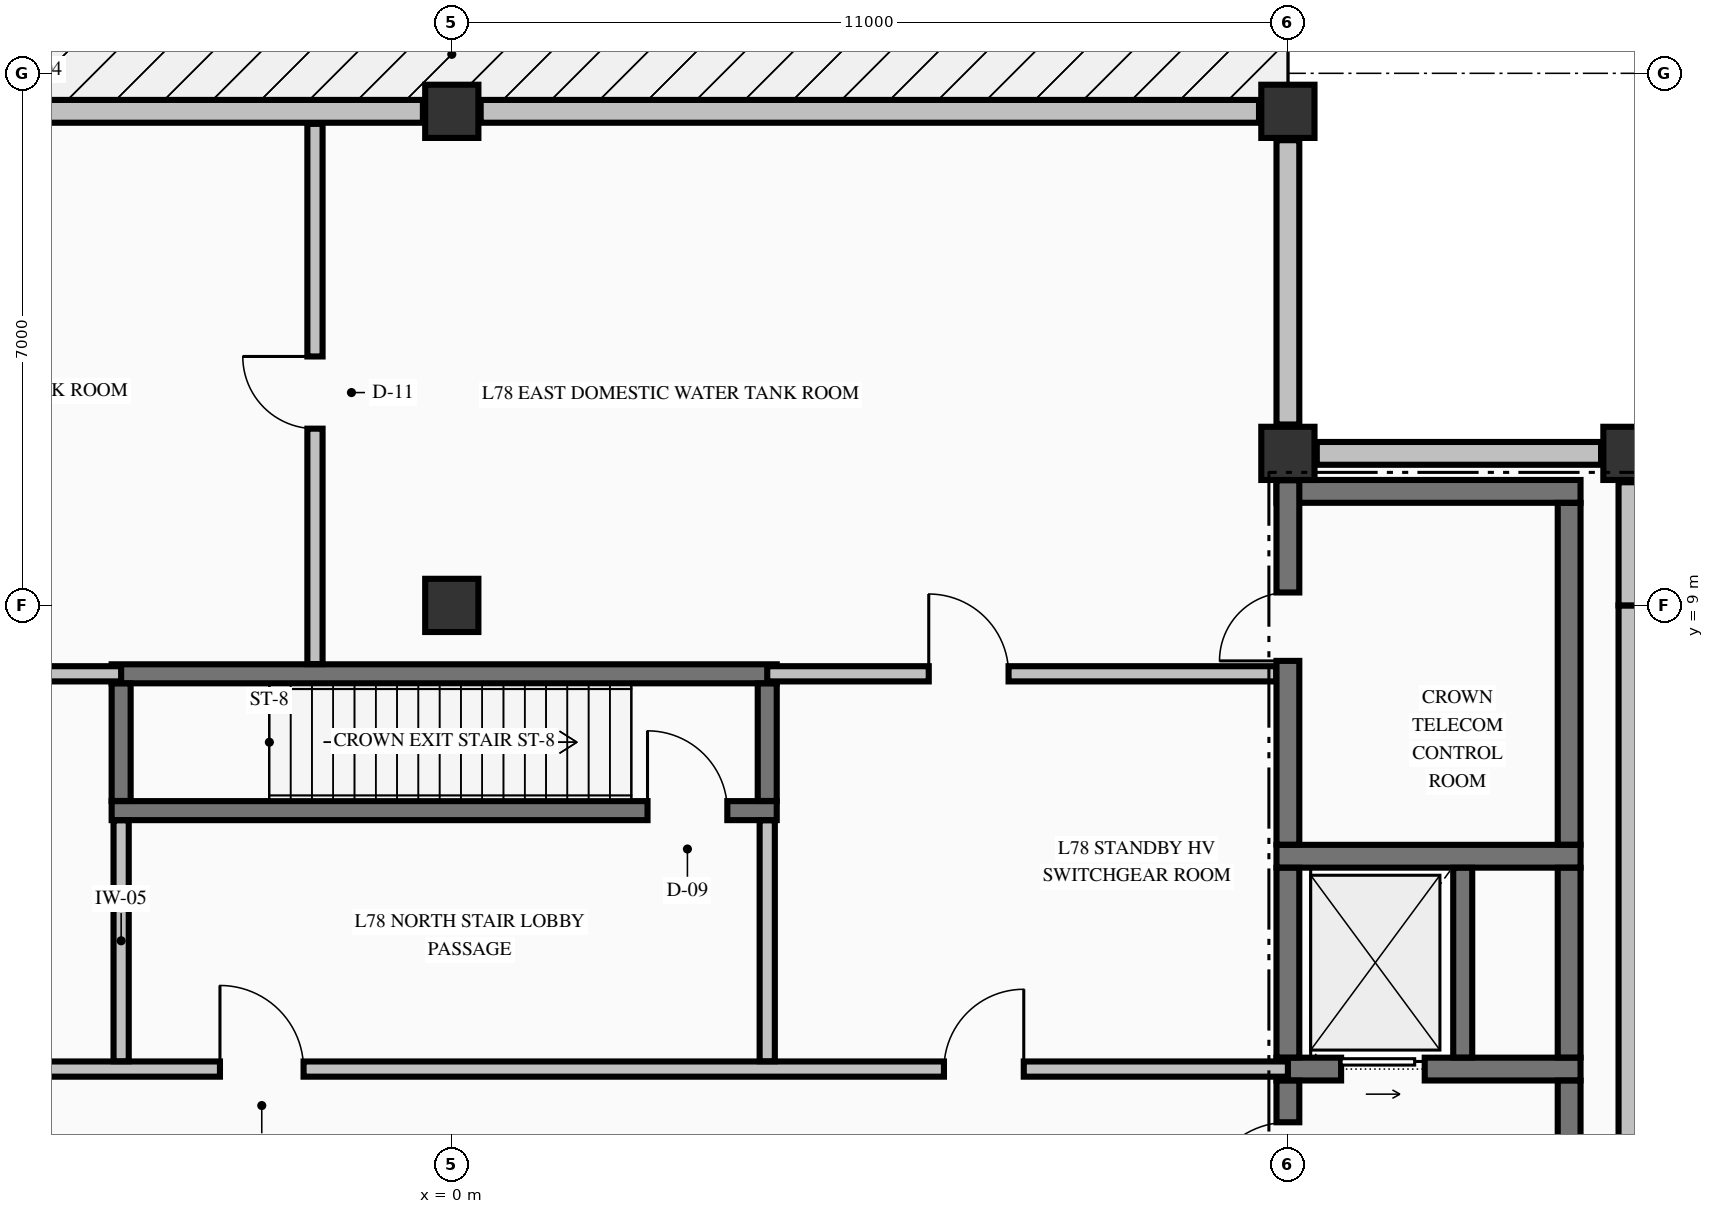
"""IFC4 building model, lengths in metres.
Left out: names, types, materials, properties, quantities, classifications, styles, units other than length and angle.
Written with IfcOpenShell. Run it as: python <this file> out.ifc"""

import sys

from ifc_helpers import new_model, si_unit, direction, frame, frame_2d, origin, origin_2d, place, context, subcontext, project, spatial, rectangle, extrude, element, fill, save


model = new_model("IFC4")
c1 = context("Model", 3, precision=1e-05, world=origin(), true_north=direction((0.0, 1.0)))
c2 = subcontext(c1, "Body", "Model", "MODEL_VIEW")
j1 = project(units=[si_unit("LENGTHUNIT", "METRE"), si_unit("PLANEANGLEUNIT", "RADIAN")], contexts=[c1])
p1 = place(None, origin())
s1 = spatial("IfcSite", under=j1, at=p1, CompositionType="ELEMENT")
p2 = place(p1, origin())
s2 = spatial("IfcBuilding", under=s1, at=p2, CompositionType="ELEMENT")
p3 = place(p2, frame((0.0, 0.0, 290.98)))
s3 = spatial("IfcBuildingStorey", under=s2, at=p3, CompositionType="ELEMENT", Elevation=290.98)
for number, where, z_axis, x_axis in (
    (1, (15.5, 11.0, -0.325), (0.0, 0.0, 1.0), (1.0, 0.0, 0.0)),
    (2, (11.0, 15.5, -0.325), (0.0, 0.0, 1.0), (1.0, 0.0, 0.0)),
    (3, (0.0, 15.5, -0.325), (0.0, 0.0, 1.0), (1.0, 0.0, 0.0)),
    (4, (11.0, 11.0, -0.325), (0.0, 0.0, 1.0), (1.0, 0.0, 0.0)),
    (5, (0.0, 9.0, -0.325), (0.0, 0.0, 1.0), (1.0, 0.0, 0.0)),
):
    element("IfcColumn", number, at=place(p3, frame(where, z_axis=z_axis, x_axis=x_axis)), inside=s3, PredefinedType="COLUMN", context=c2, shape_type="SweptSolid", body=[
        extrude(rectangle(XDim=0.7, YDim=0.7, at=origin_2d()), origin(), (0.0, 0.0, 1.0), 3.06),
    ])
for number, where, z_axis, x_axis in (
    (6, (-0.38, 15.5, 0.0), (0.0, 0.0, 1.0), (-1.0, 0.0, 0.0)),
    (7, (10.62, 15.5, 0.0), (0.0, 0.0, 1.0), (-1.0, 0.0, 0.0)),
):
    element("IfcWall", number, at=place(p3, frame(where, z_axis=z_axis, x_axis=x_axis)), inside=s3, PredefinedType="STANDARD", context=c2, shape_type="SweptSolid", body=[
        extrude(rectangle(XDim=10.24, YDim=0.3, at=frame_2d((5.12, 0.0))), origin(), (0.0, 0.0, 1.0), 2.127),
    ])
p4 = place(p3, frame((15.5, 0.0, 0.0), z_axis=(0.0, 0.0, 1.0), x_axis=(0.0, 1.0, 0.0)))
e8 = element("IfcWall", 8, at=p4, inside=s3, PredefinedType="STANDARD", context=c2, shape_type="SweptSolid", body=[
    extrude(rectangle(XDim=9.0, YDim=0.3, at=frame_2d((4.5, 0.0))), origin(), (0.0, 0.0, 1.0), 2.127),
])
p5 = place(p3, frame((15.5, 9.0, 0.0), z_axis=(0.0, 0.0, 1.0), x_axis=(0.0, 1.0, 0.0)))
e9 = element("IfcWall", 9, at=p5, inside=s3, PredefinedType="STANDARD", context=c2, shape_type="SweptSolid", body=[
    extrude(rectangle(XDim=1.62, YDim=0.3, at=frame_2d((0.81, 0.0))), origin(), (0.0, 0.0, 1.0), 2.127),
])
p6 = place(p3, frame((15.12, 11.0, 0.0), z_axis=(0.0, 0.0, 1.0), x_axis=(-1.0, 0.0, 0.0)))
e10 = element("IfcWall", 10, at=p6, inside=s3, PredefinedType="STANDARD", context=c2, shape_type="SweptSolid", body=[
    extrude(rectangle(XDim=3.74, YDim=0.3, at=frame_2d((1.87, 0.0))), origin(), (0.0, 0.0, 1.0), 1.077),
])
p7 = place(p3, frame((11.0, 11.38, 0.0), z_axis=(0.0, 0.0, 1.0), x_axis=(0.0, 1.0, 0.0)))
e11 = element("IfcWall", 11, at=p7, inside=s3, PredefinedType="STANDARD", context=c2, shape_type="SweptSolid", body=[
    extrude(rectangle(XDim=3.74, YDim=0.3, at=frame_2d((1.87, 0.0))), origin(), (0.0, 0.0, 1.0), 0.927),
])
p8 = place(p3, frame((10.85, 2.9, 0.0), z_axis=(0.0, 0.0, 1.0), x_axis=(1.0, 0.0, 0.0)))
e12 = element("IfcWall", 12, at=p8, inside=s3, PredefinedType="SHEAR", context=c2, shape_type="SweptSolid", body=[
    extrude(rectangle(XDim=4.0, YDim=0.3, at=frame_2d((2.0, 0.0))), origin(), (0.0, 0.0, 1.0), 2.735),
])
p9 = place(p8, frame((0.85, 0.0, 0.0)))
e13 = element("IfcOpeningElement", 13, at=p9, cuts=e12, PredefinedType="OPENING", context=c2, shape_type="SweptSolid", body=[
    extrude(rectangle(XDim=1.1, YDim=2.2, at=frame_2d((0.55, 1.1))), frame((0.0, 0.16, 0.0), z_axis=(0.0, -1.0, 0.0), x_axis=(1.0, 0.0, 0.0)), (0.0, 0.0, 1.0), 0.32),
])
p10 = place(p3, frame((10.85, 5.7, 0.0), z_axis=(0.0, 0.0, 1.0), x_axis=(1.0, 0.0, 0.0)))
e14 = element("IfcWall", 14, at=p10, inside=s3, PredefinedType="SHEAR", context=c2, shape_type="SweptSolid", body=[
    extrude(rectangle(XDim=4.0, YDim=0.3, at=frame_2d((2.0, 0.0))), origin(), (0.0, 0.0, 1.0), 2.735),
])
p11 = place(p3, frame((-4.475, 6.3, 0.0), z_axis=(0.0, 0.0, 1.0), x_axis=(1.0, 0.0, 0.0)))
e15 = element("IfcWall", 15, at=p11, inside=s3, PredefinedType="SOLIDWALL", context=c2, shape_type="SweptSolid", body=[
    extrude(rectangle(XDim=8.75, YDim=0.25, at=frame_2d((4.375, 0.0))), origin(), (0.0, 0.0, 1.0), 2.735),
])
p12 = place(p11, frame((7.05, 0.0, 0.0)))
e16 = element("IfcOpeningElement", 16, at=p12, cuts=e15, PredefinedType="OPENING", context=c2, shape_type="SweptSolid", body=[
    extrude(rectangle(XDim=1.05, YDim=2.15, at=frame_2d((0.525, 1.075))), frame((0.0, 0.135, 0.0), z_axis=(0.0, -1.0, 0.0), x_axis=(1.0, 0.0, 0.0)), (0.0, 0.0, 1.0), 0.27),
])
p13 = place(p3, frame((-4.475, 8.1, 0.0), z_axis=(0.0, 0.0, 1.0), x_axis=(1.0, 0.0, 0.0)))
e17 = element("IfcWall", 17, at=p13, inside=s3, PredefinedType="SOLIDWALL", context=c2, shape_type="SweptSolid", body=[
    extrude(rectangle(XDim=8.75, YDim=0.25, at=frame_2d((4.375, 0.0))), origin(), (0.0, 0.0, 1.0), 2.735),
])
p14 = place(p3, frame((10.85, 10.5, 0.0), z_axis=(0.0, 0.0, 1.0), x_axis=(1.0, 0.0, 0.0)))
e18 = element("IfcWall", 18, at=p14, inside=s3, PredefinedType="SHEAR", context=c2, shape_type="SweptSolid", body=[
    extrude(rectangle(XDim=4.0, YDim=0.3, at=frame_2d((2.0, 0.0))), origin(), (0.0, 0.0, 1.0), 2.735),
])
p15 = place(p3, frame((-11.0, 2.9, 0.0), z_axis=(0.0, 0.0, 1.0), x_axis=(1.0, 0.0, 0.0)))
e19 = element("IfcWall", 19, at=p15, inside=s3, PredefinedType="PARTITIONING", context=c2, shape_type="SweptSolid", body=[
    extrude(rectangle(XDim=22.0, YDim=0.2, at=frame_2d((11.0, 0.0))), origin(), (0.0, 0.0, 1.0), 2.735),
])
p16 = place(p15, frame((7.95, 0.0, 0.0)))
e20 = element("IfcOpeningElement", 20, at=p16, cuts=e19, PredefinedType="OPENING", context=c2, shape_type="SweptSolid", body=[
    extrude(rectangle(XDim=1.1, YDim=2.15, at=frame_2d((0.55, 1.075))), frame((0.0, 0.11, 0.0), z_axis=(0.0, -1.0, 0.0), x_axis=(1.0, 0.0, 0.0)), (0.0, 0.0, 1.0), 0.22),
])
p17 = place(p15, frame((17.475, 0.0, 0.0)))
e21 = element("IfcOpeningElement", 21, at=p17, cuts=e19, PredefinedType="OPENING", context=c2, shape_type="SweptSolid", body=[
    extrude(rectangle(XDim=1.05, YDim=2.15, at=frame_2d((0.525, 1.075))), frame((0.0, 0.11, 0.0), z_axis=(0.0, -1.0, 0.0), x_axis=(1.0, 0.0, 0.0)), (0.0, 0.0, 1.0), 0.22),
])
p18 = place(p15, frame((3.475, 0.0, 0.0)))
e22 = element("IfcOpeningElement", 22, at=p18, cuts=e19, PredefinedType="OPENING", context=c2, shape_type="SweptSolid", body=[
    extrude(rectangle(XDim=1.05, YDim=2.15, at=frame_2d((0.525, 1.075))), frame((0.0, 0.11, 0.0), z_axis=(0.0, -1.0, 0.0), x_axis=(1.0, 0.0, 0.0)), (0.0, 0.0, 1.0), 0.22),
])
p19 = place(p3, frame((-10.847, 8.1, 0.0), z_axis=(0.0, 0.0, 1.0), x_axis=(1.0, 0.0, 0.0)))
e23 = element("IfcWall", 23, at=p19, inside=s3, PredefinedType="PARTITIONING", context=c2, shape_type="SweptSolid", body=[
    extrude(rectangle(XDim=6.497, YDim=0.2, at=frame_2d((3.249, 0.0))), origin(), (0.0, 0.0, 1.0), 2.735),
])
p20 = place(p3, frame((4.15, 8.1, 0.0), z_axis=(0.0, 0.0, 1.0), x_axis=(1.0, 0.0, 0.0)))
e24 = element("IfcWall", 24, at=p20, inside=s3, PredefinedType="PARTITIONING", context=c2, shape_type="SweptSolid", body=[
    extrude(rectangle(XDim=6.697, YDim=0.2, at=frame_2d((3.349, 0.0))), origin(), (0.0, 0.0, 1.0), 2.735),
])
p21 = place(p20, frame((2.125, 0.0, 0.0)))
e25 = element("IfcOpeningElement", 25, at=p21, cuts=e24, PredefinedType="OPENING", context=c2, shape_type="SweptSolid", body=[
    extrude(rectangle(XDim=1.05, YDim=2.15, at=frame_2d((0.525, 1.075))), frame((0.0, 0.11, 0.0), z_axis=(0.0, -1.0, 0.0), x_axis=(1.0, 0.0, 0.0)), (0.0, 0.0, 1.0), 0.22),
])
for number, where, z_axis, x_axis in (
    (26, (-4.35, 6.427, 0.0), (0.0, 0.0, 1.0), (0.0, 1.0, 0.0)),
    (27, (4.15, 6.427, 0.0), (0.0, 0.0, 1.0), (0.0, 1.0, 0.0)),
):
    element("IfcWall", number, at=place(p3, frame(where, z_axis=z_axis, x_axis=x_axis)), inside=s3, PredefinedType="SOLIDWALL", context=c2, shape_type="SweptSolid", body=[
        extrude(rectangle(XDim=1.546, YDim=0.25, at=frame_2d((0.773, 0.0))), origin(), (0.0, 0.0, 1.0), 2.735),
    ])
p22 = place(p3, frame((11.0, 0.354, 0.0), z_axis=(0.0, 0.0, 1.0), x_axis=(0.0, 1.0, 0.0)))
e28 = element("IfcWall", 28, at=p22, inside=s3, PredefinedType="SHEAR", context=c2, shape_type="SweptSolid", body=[
    extrude(rectangle(XDim=2.394, YDim=0.3, at=frame_2d((1.197, 0.0))), origin(), (0.0, 0.0, 1.0), 2.735),
])
p23 = place(p22, frame((0.746, 0.0, 0.0)))
e29 = element("IfcOpeningElement", 29, at=p23, cuts=e28, PredefinedType="OPENING", context=c2, shape_type="SweptSolid", body=[
    extrude(rectangle(XDim=1.1, YDim=2.15, at=frame_2d((0.55, 1.075))), frame((0.0, 0.16, 0.0), z_axis=(0.0, -1.0, 0.0), x_axis=(1.0, 0.0, 0.0)), (0.0, 0.0, 1.0), 0.32),
])
p24 = place(p3, frame((11.0, 3.052, 0.0), z_axis=(0.0, 0.0, 1.0), x_axis=(0.0, 1.0, 0.0)))
e30 = element("IfcWall", 30, at=p24, inside=s3, PredefinedType="SHEAR", context=c2, shape_type="SweptSolid", body=[
    extrude(rectangle(XDim=2.496, YDim=0.3, at=frame_2d((1.248, 0.0))), origin(), (0.0, 0.0, 1.0), 2.735),
])
p25 = place(p3, frame((11.0, 5.852, 0.0), z_axis=(0.0, 0.0, 1.0), x_axis=(0.0, 1.0, 0.0)))
e31 = element("IfcWall", 31, at=p25, inside=s3, PredefinedType="SHEAR", context=c2, shape_type="SweptSolid", body=[
    extrude(rectangle(XDim=4.794, YDim=0.3, at=frame_2d((2.397, 0.0))), origin(), (0.0, 0.0, 1.0), 2.735),
])
p26 = place(p25, frame((2.418, 0.0, 0.0)))
e32 = element("IfcOpeningElement", 32, at=p26, cuts=e31, PredefinedType="OPENING", context=c2, shape_type="SweptSolid", body=[
    extrude(rectangle(XDim=0.9, YDim=2.15, at=frame_2d((0.45, 1.075))), frame((0.0, 0.16, 0.0), z_axis=(0.0, -1.0, 0.0), x_axis=(1.0, 0.0, 0.0)), (0.0, 0.0, 1.0), 0.32),
])
p27 = place(p3, frame((13.3, 3.052, 0.0), z_axis=(0.0, 0.0, 1.0), x_axis=(0.0, 1.0, 0.0)))
e33 = element("IfcWall", 33, at=p27, inside=s3, PredefinedType="SOLIDWALL", context=c2, shape_type="SweptSolid", body=[
    extrude(rectangle(XDim=2.496, YDim=0.25, at=frame_2d((1.248, 0.0))), origin(), (0.0, 0.0, 1.0), 2.735),
])
p28 = place(p3, frame((14.7, -0.098, 0.0), z_axis=(0.0, 0.0, 1.0), x_axis=(0.0, 1.0, 0.0)))
e34 = element("IfcWall", 34, at=p28, inside=s3, PredefinedType="SHEAR", context=c2, shape_type="SweptSolid", body=[
    extrude(rectangle(XDim=2.846, YDim=0.3, at=frame_2d((1.423, 0.0))), origin(), (0.0, 0.0, 1.0), 2.735),
])
p29 = place(p3, frame((14.7, 3.052, 0.0), z_axis=(0.0, 0.0, 1.0), x_axis=(0.0, 1.0, 0.0)))
e35 = element("IfcWall", 35, at=p29, inside=s3, PredefinedType="SHEAR", context=c2, shape_type="SweptSolid", body=[
    extrude(rectangle(XDim=2.496, YDim=0.3, at=frame_2d((1.248, 0.0))), origin(), (0.0, 0.0, 1.0), 2.735),
])
p30 = place(p3, frame((14.7, 5.852, 0.0), z_axis=(0.0, 0.0, 1.0), x_axis=(0.0, 1.0, 0.0)))
e36 = element("IfcWall", 36, at=p30, inside=s3, PredefinedType="SHEAR", context=c2, shape_type="SweptSolid", body=[
    extrude(rectangle(XDim=4.496, YDim=0.3, at=frame_2d((2.248, 0.0))), origin(), (0.0, 0.0, 1.0), 2.735),
])
p31 = place(p3, frame((-4.35, 3.003, 0.0), z_axis=(0.0, 0.0, 1.0), x_axis=(0.0, 1.0, 0.0)))
e37 = element("IfcWall", 37, at=p31, inside=s3, PredefinedType="PARTITIONING", context=c2, shape_type="SweptSolid", body=[
    extrude(rectangle(XDim=3.169, YDim=0.2, at=frame_2d((1.584, 0.0))), origin(), (0.0, 0.0, 1.0), 2.735),
])
p32 = place(p3, frame((-1.8, 8.228, 0.0), z_axis=(0.0, 0.0, 1.0), x_axis=(0.0, 1.0, 0.0)))
e38 = element("IfcWall", 38, at=p32, inside=s3, PredefinedType="PARTITIONING", context=c2, shape_type="SweptSolid", body=[
    extrude(rectangle(XDim=7.107, YDim=0.2, at=frame_2d((3.553, 0.0))), origin(), (0.0, 0.0, 1.0), 2.735),
])
p33 = place(p32, frame((3.097, 0.0, 0.0)))
e39 = element("IfcOpeningElement", 39, at=p33, cuts=e38, PredefinedType="OPENING", context=c2, shape_type="SweptSolid", body=[
    extrude(rectangle(XDim=0.95, YDim=2.15, at=frame_2d((0.475, 1.075))), frame((0.0, 0.11, 0.0), z_axis=(0.0, -1.0, 0.0), x_axis=(1.0, 0.0, 0.0)), (0.0, 0.0, 1.0), 0.22),
])
p34 = place(p3, frame((4.15, 3.003, 0.0), z_axis=(0.0, 0.0, 1.0), x_axis=(0.0, 1.0, 0.0)))
e40 = element("IfcWall", 40, at=p34, inside=s3, PredefinedType="PARTITIONING", context=c2, shape_type="SweptSolid", body=[
    extrude(rectangle(XDim=3.169, YDim=0.2, at=frame_2d((1.584, 0.0))), origin(), (0.0, 0.0, 1.0), 2.735),
])
p35 = place(p23, origin())
e41 = element("IfcDoor", 41, at=p35, inside=s3, OperationType="SINGLE_SWING_LEFT", PredefinedType="DOOR", context=c2, shape_type="SweptSolid", body=[
    extrude(rectangle(XDim=1.1, YDim=2.15, at=frame_2d((0.55, 1.075))), frame((0.0, 0.025, 0.0), z_axis=(0.0, -1.0, 0.0), x_axis=(1.0, 0.0, 0.0)), (0.0, 0.0, 1.0), 0.05),
])
fill(e29, e41)
p36 = place(p9, origin())
e42 = element("IfcDoor", 42, at=p36, inside=s3, OperationType="SLIDING_TO_RIGHT", PredefinedType="DOOR", context=c2, shape_type="SweptSolid", body=[
    extrude(rectangle(XDim=1.1, YDim=2.2, at=frame_2d((0.55, 1.1))), frame((0.0, 0.025, 0.0), z_axis=(0.0, -1.0, 0.0), x_axis=(1.0, 0.0, 0.0)), (0.0, 0.0, 1.0), 0.05),
])
fill(e13, e42)
p37 = place(p26, origin())
e43 = element("IfcDoor", 43, at=p37, inside=s3, OperationType="SINGLE_SWING_LEFT", PredefinedType="DOOR", context=c2, shape_type="SweptSolid", body=[
    extrude(rectangle(XDim=0.9, YDim=2.15, at=frame_2d((0.45, 1.075))), frame((0.0, 0.025, 0.0), z_axis=(0.0, -1.0, 0.0), x_axis=(1.0, 0.0, 0.0)), (0.0, 0.0, 1.0), 0.05),
])
fill(e32, e43)
p38 = place(p12, origin())
e44 = element("IfcDoor", 44, at=p38, inside=s3, OperationType="SINGLE_SWING_LEFT", PredefinedType="DOOR", context=c2, shape_type="SweptSolid", body=[
    extrude(rectangle(XDim=1.05, YDim=2.15, at=frame_2d((0.525, 1.075))), frame((0.0, 0.025, 0.0), z_axis=(0.0, -1.0, 0.0), x_axis=(1.0, 0.0, 0.0)), (0.0, 0.0, 1.0), 0.05),
])
fill(e16, e44)
p39 = place(p16, origin())
e45 = element("IfcDoor", 45, at=p39, inside=s3, OperationType="SINGLE_SWING_LEFT", PredefinedType="DOOR", context=c2, shape_type="SweptSolid", body=[
    extrude(rectangle(XDim=1.1, YDim=2.15, at=frame_2d((0.55, 1.075))), frame((0.0, 0.025, 0.0), z_axis=(0.0, -1.0, 0.0), x_axis=(1.0, 0.0, 0.0)), (0.0, 0.0, 1.0), 0.05),
])
fill(e20, e45)
p40 = place(p17, origin())
e46 = element("IfcDoor", 46, at=p40, inside=s3, OperationType="SINGLE_SWING_RIGHT", PredefinedType="DOOR", context=c2, shape_type="SweptSolid", body=[
    extrude(rectangle(XDim=1.05, YDim=2.15, at=frame_2d((0.525, 1.075))), frame((0.0, 0.025, 0.0), z_axis=(0.0, -1.0, 0.0), x_axis=(1.0, 0.0, 0.0)), (0.0, 0.0, 1.0), 0.05),
])
fill(e21, e46)
p41 = place(p21, origin())
e47 = element("IfcDoor", 47, at=p41, inside=s3, OperationType="SINGLE_SWING_LEFT", PredefinedType="DOOR", context=c2, shape_type="SweptSolid", body=[
    extrude(rectangle(XDim=1.05, YDim=2.15, at=frame_2d((0.525, 1.075))), frame((0.0, 0.025, 0.0), z_axis=(0.0, -1.0, 0.0), x_axis=(1.0, 0.0, 0.0)), (0.0, 0.0, 1.0), 0.05),
])
fill(e25, e47)
p42 = place(p33, origin())
e48 = element("IfcDoor", 48, at=p42, inside=s3, OperationType="SINGLE_SWING_RIGHT", PredefinedType="DOOR", context=c2, shape_type="SweptSolid", body=[
    extrude(rectangle(XDim=0.95, YDim=2.15, at=frame_2d((0.475, 1.075))), frame((0.0, 0.025, 0.0), z_axis=(0.0, -1.0, 0.0), x_axis=(1.0, 0.0, 0.0)), (0.0, 0.0, 1.0), 0.05),
])
fill(e39, e48)
save(model, sys.argv[1])
